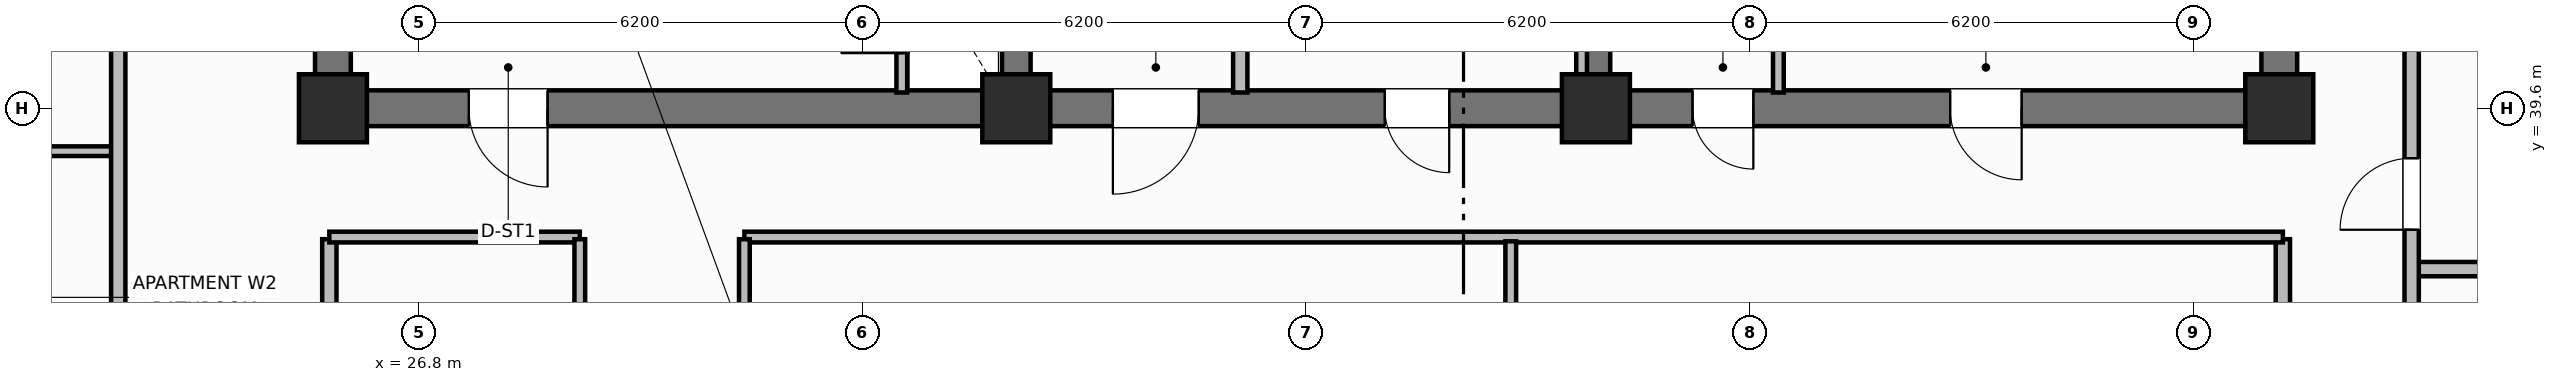
"""IFC4 building model, lengths in metres.
Left out: names, types, materials, properties, quantities, classifications, styles, units other than length and angle.
Written with IfcOpenShell. Run it as: python <this file> out.ifc"""

import sys

from ifc_helpers import new_model, si_unit, direction, frame, frame_2d, origin, origin_2d, place, context, subcontext, project, spatial, rectangle, extrude, element, fill, save


model = new_model("IFC4")
c1 = context("Model", 3, precision=1e-05, world=origin(), true_north=direction((0.0, 1.0)))
c2 = subcontext(c1, "Body", "Model", "MODEL_VIEW")
j1 = project(units=[si_unit("LENGTHUNIT", "METRE"), si_unit("PLANEANGLEUNIT", "RADIAN")], contexts=[c1])
p1 = place(None, origin())
s1 = spatial("IfcSite", under=j1, at=p1, CompositionType="ELEMENT")
p2 = place(p1, origin())
s2 = spatial("IfcBuilding", under=s1, at=p2, CompositionType="ELEMENT")
p3 = place(p2, frame((0.0, 0.0, 181.1)))
s3 = spatial("IfcBuildingStorey", under=s2, at=p3, CompositionType="ELEMENT", Elevation=181.1)
for number, where, z_axis, x_axis in (
    (1, (25.6, 39.85, 0.0), (0.0, 0.0, 1.0), (0.0, 1.0, 0.0)),
    (2, (52.8, 39.85, 0.0), (0.0, 0.0, 1.0), (0.0, 1.0, 0.0)),
):
    element("IfcWall", number, at=place(p3, frame(where, z_axis=z_axis, x_axis=x_axis)), inside=s3, PredefinedType="SHEAR", context=c2, shape_type="SweptSolid", body=[
        extrude(rectangle(XDim=5.7, YDim=0.5, at=frame_2d((2.85, 0.0))), origin(), (0.0, 0.0, 1.0), 3.7),
    ])
p4 = place(p3, frame((52.8, 39.6, 0.0), z_axis=(0.0, 0.0, 1.0), x_axis=(-1.0, 0.0, 0.0)))
e3 = element("IfcWall", 3, at=p4, inside=s3, PredefinedType="SHEAR", context=c2, shape_type="SweptSolid", body=[
    extrude(rectangle(XDim=27.2, YDim=0.5, at=frame_2d((13.6, 0.0))), origin(), (0.0, 0.0, 1.0), 3.7),
])
p5 = place(p4, frame((24.2, 0.0, 0.0)))
e4 = element("IfcOpeningElement", 4, at=p5, cuts=e3, PredefinedType="OPENING", context=c2, shape_type="SweptSolid", body=[
    extrude(rectangle(XDim=1.1, YDim=2.15, at=frame_2d((0.55, 1.075))), frame((0.0, 0.26, 0.0), z_axis=(0.0, -1.0, 0.0), x_axis=(1.0, 0.0, 0.0)), (0.0, 0.0, 1.0), 0.52),
])
p6 = place(p4, frame((15.1, 0.0, 0.0)))
e5 = element("IfcOpeningElement", 5, at=p6, cuts=e3, PredefinedType="OPENING", context=c2, shape_type="SweptSolid", body=[
    extrude(rectangle(XDim=1.2, YDim=2.15, at=frame_2d((0.6, 1.075))), frame((0.0, 0.26, 0.0), z_axis=(0.0, -1.0, 0.0), x_axis=(1.0, 0.0, 0.0)), (0.0, 0.0, 1.0), 0.52),
])
p7 = place(p4, frame((11.6, 0.0, 0.0)))
e6 = element("IfcOpeningElement", 6, at=p7, cuts=e3, PredefinedType="OPENING", context=c2, shape_type="SweptSolid", body=[
    extrude(rectangle(XDim=0.9, YDim=2.1, at=frame_2d((0.45, 1.05))), frame((0.0, 0.26, 0.0), z_axis=(0.0, -1.0, 0.0), x_axis=(1.0, 0.0, 0.0)), (0.0, 0.0, 1.0), 0.52),
])
p8 = place(p4, frame((7.35, 0.0, 0.0)))
e7 = element("IfcOpeningElement", 7, at=p8, cuts=e3, PredefinedType="OPENING", context=c2, shape_type="SweptSolid", body=[
    extrude(rectangle(XDim=0.85, YDim=2.1, at=frame_2d((0.425, 1.05))), frame((0.0, 0.26, 0.0), z_axis=(0.0, -1.0, 0.0), x_axis=(1.0, 0.0, 0.0)), (0.0, 0.0, 1.0), 0.52),
])
p9 = place(p4, frame((3.6, 0.0, 0.0)))
e8 = element("IfcOpeningElement", 8, at=p9, cuts=e3, PredefinedType="OPENING", context=c2, shape_type="SweptSolid", body=[
    extrude(rectangle(XDim=1.0, YDim=2.15, at=frame_2d((0.5, 1.075))), frame((0.0, 0.26, 0.0), z_axis=(0.0, -1.0, 0.0), x_axis=(1.0, 0.0, 0.0)), (0.0, 0.0, 1.0), 0.52),
])
for number, where, z_axis, x_axis in (
    (9, (35.15, 39.85, 0.0), (0.0, 0.0, 1.0), (0.0, 1.0, 0.0)),
    (10, (43.25, 39.85, 0.0), (0.0, 0.0, 1.0), (0.0, 1.0, 0.0)),
):
    element("IfcWall", number, at=place(p3, frame(where, z_axis=z_axis, x_axis=x_axis)), inside=s3, PredefinedType="SHEAR", context=c2, shape_type="SweptSolid", body=[
        extrude(rectangle(XDim=5.7, YDim=0.4, at=frame_2d((2.85, 0.0))), origin(), (0.0, 0.0, 1.0), 3.7),
    ])
for number, where, z_axis, x_axis in (
    (11, (25.6, 39.6, 0.0), (0.0, 0.0, 1.0), (1.0, 0.0, 0.0)),
    (12, (35.15, 39.6, 0.0), (0.0, 0.0, 1.0), (1.0, 0.0, 0.0)),
    (13, (43.25, 39.6, 0.0), (0.0, 0.0, 1.0), (1.0, 0.0, 0.0)),
    (14, (52.8, 39.6, 0.0), (0.0, 0.0, 1.0), (1.0, 0.0, 0.0)),
):
    element("IfcColumn", number, at=place(p3, frame(where, z_axis=z_axis, x_axis=x_axis)), inside=s3, PredefinedType="COLUMN", context=c2, shape_type="SweptSolid", body=[
        extrude(rectangle(XDim=0.95, YDim=0.95, at=origin_2d()), origin(), (0.0, 0.0, 1.0), 3.7),
    ])
p10 = place(p3, frame((33.55, 39.82, 0.0), z_axis=(0.0, 0.0, 1.0), x_axis=(0.0, 1.0, 0.0)))
e15 = element("IfcWall", 15, at=p10, inside=s3, PredefinedType="PARTITIONING", context=c2, shape_type="SweptSolid", body=[
    extrude(rectangle(XDim=2.13, YDim=0.15, at=frame_2d((1.065, 0.0))), origin(), (0.0, 0.0, 1.0), 2.55),
])
p11 = place(p10, frame((0.55, 0.0, 0.0)))
e16 = element("IfcOpeningElement", 16, at=p11, cuts=e15, PredefinedType="OPENING", context=c2, shape_type="SweptSolid", body=[
    extrude(rectangle(XDim=0.85, YDim=2.05, at=frame_2d((0.425, 1.025))), frame((0.0, 0.085, 0.0), z_axis=(0.0, -1.0, 0.0), x_axis=(1.0, 0.0, 0.0)), (0.0, 0.0, 1.0), 0.17),
])
p12 = place(p3, frame((38.28, 39.82, 0.0), z_axis=(0.0, 0.0, 1.0), x_axis=(0.0, 1.0, 0.0)))
e17 = element("IfcWall", 17, at=p12, inside=s3, PredefinedType="PARTITIONING", context=c2, shape_type="SweptSolid", body=[
    extrude(rectangle(XDim=5.63, YDim=0.2, at=frame_2d((2.815, 0.0))), origin(), (0.0, 0.0, 1.0), 2.55),
])
for number, where, z_axis, x_axis in (
    (18, (43.05, 39.82, 0.0), (0.0, 0.0, 1.0), (0.0, 1.0, 0.0)),
    (19, (45.8, 39.82, 0.0), (0.0, 0.0, 1.0), (0.0, 1.0, 0.0)),
):
    element("IfcWall", number, at=place(p3, frame(where, z_axis=z_axis, x_axis=x_axis)), inside=s3, PredefinedType="PARTITIONING", context=c2, shape_type="SweptSolid", body=[
        extrude(rectangle(XDim=5.63, YDim=0.15, at=frame_2d((2.815, 0.0))), origin(), (0.0, 0.0, 1.0), 2.55),
    ])
for number, where, z_axis, x_axis in (
    (20, (25.55, 18.63, 0.0), (0.0, 0.0, 1.0), (0.0, 1.0, 0.0)),
    (21, (52.85, 18.63, 0.0), (0.0, 0.0, 1.0), (0.0, 1.0, 0.0)),
):
    element("IfcWall", number, at=place(p3, frame(where, z_axis=z_axis, x_axis=x_axis)), inside=s3, PredefinedType="PARTITIONING", context=c2, shape_type="SweptSolid", body=[
        extrude(rectangle(XDim=19.14, YDim=0.2, at=frame_2d((9.57, 0.0))), origin(), (0.0, 0.0, 1.0), 2.55),
    ])
p13 = place(p3, frame((25.55, 37.8, 0.0), z_axis=(0.0, 0.0, 1.0), x_axis=(1.0, 0.0, 0.0)))
e22 = element("IfcWall", 22, at=p13, inside=s3, PredefinedType="PARTITIONING", context=c2, shape_type="SweptSolid", body=[
    extrude(rectangle(XDim=3.5, YDim=0.15, at=frame_2d((1.75, 0.0))), origin(), (0.0, 0.0, 1.0), 2.55),
])
p14 = place(p3, frame((31.35, 37.8, 0.0), z_axis=(0.0, 0.0, 1.0), x_axis=(1.0, 0.0, 0.0)))
e23 = element("IfcWall", 23, at=p14, inside=s3, PredefinedType="PARTITIONING", context=c2, shape_type="SweptSolid", body=[
    extrude(rectangle(XDim=21.5, YDim=0.15, at=frame_2d((10.75, 0.0))), origin(), (0.0, 0.0, 1.0), 2.55),
])
p15 = place(p3, frame((42.06, 18.66, 0.0), z_axis=(0.0, 0.0, 1.0), x_axis=(0.0, 1.0, 0.0)))
e24 = element("IfcWall", 24, at=p15, inside=s3, PredefinedType="PARTITIONING", context=c2, shape_type="SweptSolid", body=[
    extrude(rectangle(XDim=19.08, YDim=0.15, at=frame_2d((9.54, 0.0))), origin(), (0.0, 0.0, 1.0), 2.55),
])
p16 = place(p15, frame((6.5, 0.0, 0.0)))
e25 = element("IfcOpeningElement", 25, at=p16, cuts=e24, PredefinedType="OPENING", context=c2, shape_type="SweptSolid", body=[
    extrude(rectangle(XDim=1.0, YDim=2.15, at=frame_2d((0.5, 1.075))), frame((0.0, 0.085, 0.0), z_axis=(0.0, -1.0, 0.0), x_axis=(1.0, 0.0, 0.0)), (0.0, 0.0, 1.0), 0.17),
])
p17 = place(p3, frame((29.05, 18.63, 0.0), z_axis=(0.0, 0.0, 1.0), x_axis=(0.0, 1.0, 0.0)))
e26 = element("IfcWall", 26, at=p17, inside=s3, PredefinedType="PARTITIONING", context=c2, shape_type="SweptSolid", body=[
    extrude(rectangle(XDim=19.14, YDim=0.15, at=frame_2d((9.57, 0.0))), origin(), (0.0, 0.0, 1.0), 2.55),
])
p18 = place(p17, frame((5.5, 0.0, 0.0)))
e27 = element("IfcOpeningElement", 27, at=p18, cuts=e26, PredefinedType="OPENING", context=c2, shape_type="SweptSolid", body=[
    extrude(rectangle(XDim=1.0, YDim=2.15, at=frame_2d((0.5, 1.075))), frame((0.0, 0.085, 0.0), z_axis=(0.0, -1.0, 0.0), x_axis=(1.0, 0.0, 0.0)), (0.0, 0.0, 1.0), 0.17),
])
p19 = place(p3, frame((31.35, 18.63, 0.0), z_axis=(0.0, 0.0, 1.0), x_axis=(0.0, 1.0, 0.0)))
e28 = element("IfcWall", 28, at=p19, inside=s3, PredefinedType="PARTITIONING", context=c2, shape_type="SweptSolid", body=[
    extrude(rectangle(XDim=19.14, YDim=0.15, at=frame_2d((9.57, 0.0))), origin(), (0.0, 0.0, 1.0), 2.55),
])
p20 = place(p19, frame((5.5, 0.0, 0.0)))
e29 = element("IfcOpeningElement", 29, at=p20, cuts=e28, PredefinedType="OPENING", context=c2, shape_type="SweptSolid", body=[
    extrude(rectangle(XDim=1.0, YDim=2.15, at=frame_2d((0.5, 1.075))), frame((0.0, 0.085, 0.0), z_axis=(0.0, -1.0, 0.0), x_axis=(1.0, 0.0, 0.0)), (0.0, 0.0, 1.0), 0.17),
])
p21 = place(p3, frame((20.35, 39.0, 0.0), z_axis=(0.0, 0.0, 1.0), x_axis=(1.0, 0.0, 0.0)))
e30 = element("IfcWall", 30, at=p21, inside=s3, PredefinedType="PARTITIONING", context=c2, shape_type="SweptSolid", body=[
    extrude(rectangle(XDim=2.25, YDim=0.135, at=frame_2d((1.125, 0.0))), origin(), (0.0, 0.0, 1.0), 2.55),
])
p22 = place(p3, frame((22.6, 10.6, 0.0), z_axis=(0.0, 0.0, 1.0), x_axis=(0.0, 1.0, 0.0)))
e31 = element("IfcWall", 31, at=p22, inside=s3, PredefinedType="PARTITIONING", context=c2, shape_type="SweptSolid", body=[
    extrude(rectangle(XDim=35.2, YDim=0.2, at=frame_2d((17.6, 0.0))), origin(), (0.0, 0.0, 1.0), 2.55),
])
p23 = place(p22, frame((2.65, 0.0, 0.0)))
e32 = element("IfcOpeningElement", 32, at=p23, cuts=e31, PredefinedType="OPENING", context=c2, shape_type="SweptSolid", body=[
    extrude(rectangle(XDim=1.0, YDim=2.15, at=frame_2d((0.5, 1.075))), frame((0.0, 0.11, 0.0), z_axis=(0.0, -1.0, 0.0), x_axis=(1.0, 0.0, 0.0)), (0.0, 0.0, 1.0), 0.22),
])
p24 = place(p22, frame((22.75, 0.0, 0.0)))
e33 = element("IfcOpeningElement", 33, at=p24, cuts=e31, PredefinedType="OPENING", context=c2, shape_type="SweptSolid", body=[
    extrude(rectangle(XDim=1.0, YDim=2.15, at=frame_2d((0.5, 1.075))), frame((0.0, 0.11, 0.0), z_axis=(0.0, -1.0, 0.0), x_axis=(1.0, 0.0, 0.0)), (0.0, 0.0, 1.0), 0.22),
])
p25 = place(p3, frame((54.65, 37.352, 0.0), z_axis=(0.0, 0.0, 1.0), x_axis=(1.0, 0.0, 0.0)))
e34 = element("IfcWall", 34, at=p25, inside=s3, PredefinedType="PARTITIONING", context=c2, shape_type="SweptSolid", body=[
    extrude(rectangle(XDim=7.18, YDim=0.2, at=frame_2d((3.59, 0.0))), origin(), (0.0, 0.0, 1.0), 2.55),
])
p26 = place(p3, frame((54.65, 10.6, 0.0), z_axis=(0.0, 0.0, 1.0), x_axis=(0.0, 1.0, 0.0)))
e35 = element("IfcWall", 35, at=p26, inside=s3, PredefinedType="PARTITIONING", context=c2, shape_type="SweptSolid", body=[
    extrude(rectangle(XDim=35.2, YDim=0.2, at=frame_2d((17.6, 0.0))), origin(), (0.0, 0.0, 1.0), 2.55),
])
p27 = place(p26, frame((2.65, 0.0, 0.0)))
e36 = element("IfcOpeningElement", 36, at=p27, cuts=e35, PredefinedType="OPENING", context=c2, shape_type="SweptSolid", body=[
    extrude(rectangle(XDim=1.0, YDim=2.15, at=frame_2d((0.5, 1.075))), frame((0.0, 0.11, 0.0), z_axis=(0.0, -1.0, 0.0), x_axis=(1.0, 0.0, 0.0)), (0.0, 0.0, 1.0), 0.22),
])
p28 = place(p26, frame((11.352, 0.0, 0.0)))
e37 = element("IfcOpeningElement", 37, at=p28, cuts=e35, PredefinedType="OPENING", context=c2, shape_type="SweptSolid", body=[
    extrude(rectangle(XDim=1.0, YDim=2.15, at=frame_2d((0.5, 1.075))), frame((0.0, 0.11, 0.0), z_axis=(0.0, -1.0, 0.0), x_axis=(1.0, 0.0, 0.0)), (0.0, 0.0, 1.0), 0.22),
])
p29 = place(p26, frame((21.37, 0.0, 0.0)))
e38 = element("IfcOpeningElement", 38, at=p29, cuts=e35, PredefinedType="OPENING", context=c2, shape_type="SweptSolid", body=[
    extrude(rectangle(XDim=1.0, YDim=2.15, at=frame_2d((0.5, 1.075))), frame((0.0, 0.11, 0.0), z_axis=(0.0, -1.0, 0.0), x_axis=(1.0, 0.0, 0.0)), (0.0, 0.0, 1.0), 0.22),
])
p30 = place(p26, frame((27.302, 0.0, 0.0)))
e39 = element("IfcOpeningElement", 39, at=p30, cuts=e35, PredefinedType="OPENING", context=c2, shape_type="SweptSolid", body=[
    extrude(rectangle(XDim=1.0, YDim=2.15, at=frame_2d((0.5, 1.075))), frame((0.0, 0.11, 0.0), z_axis=(0.0, -1.0, 0.0), x_axis=(1.0, 0.0, 0.0)), (0.0, 0.0, 1.0), 0.22),
])
p31 = place(p11, origin())
e40 = element("IfcDoor", 40, at=p31, inside=s3, OperationType="SINGLE_SWING_LEFT", PredefinedType="TRAPDOOR", context=c2, shape_type="SweptSolid", body=[
    extrude(rectangle(XDim=0.85, YDim=2.05, at=frame_2d((0.425, 1.025))), frame((0.0, 0.025, 0.0), z_axis=(0.0, -1.0, 0.0), x_axis=(1.0, 0.0, 0.0)), (0.0, 0.0, 1.0), 0.05),
])
fill(e16, e40)
p32 = place(p30, origin())
e41 = element("IfcDoor", 41, at=p32, inside=s3, OperationType="SINGLE_SWING_LEFT", PredefinedType="DOOR", context=c2, shape_type="SweptSolid", body=[
    extrude(rectangle(XDim=1.0, YDim=2.15, at=frame_2d((0.5, 1.075))), frame((0.0, 0.025, 0.0), z_axis=(0.0, -1.0, 0.0), x_axis=(1.0, 0.0, 0.0)), (0.0, 0.0, 1.0), 0.05),
])
fill(e39, e41)
p33 = place(p5, origin())
e42 = element("IfcDoor", 42, at=p33, inside=s3, OperationType="SINGLE_SWING_LEFT", PredefinedType="DOOR", context=c2, shape_type="SweptSolid", body=[
    extrude(rectangle(XDim=1.1, YDim=2.15, at=frame_2d((0.55, 1.075))), frame((0.0, 0.025, 0.0), z_axis=(0.0, -1.0, 0.0), x_axis=(1.0, 0.0, 0.0)), (0.0, 0.0, 1.0), 0.05),
])
fill(e4, e42)
p34 = place(p6, origin())
e43 = element("IfcDoor", 43, at=p34, inside=s3, OperationType="SINGLE_SWING_RIGHT", PredefinedType="DOOR", context=c2, shape_type="SweptSolid", body=[
    extrude(rectangle(XDim=1.2, YDim=2.15, at=frame_2d((0.6, 1.075))), frame((0.0, 0.025, 0.0), z_axis=(0.0, -1.0, 0.0), x_axis=(1.0, 0.0, 0.0)), (0.0, 0.0, 1.0), 0.05),
])
fill(e5, e43)
p35 = place(p7, origin())
e44 = element("IfcDoor", 44, at=p35, inside=s3, OperationType="SINGLE_SWING_LEFT", PredefinedType="DOOR", context=c2, shape_type="SweptSolid", body=[
    extrude(rectangle(XDim=0.9, YDim=2.1, at=frame_2d((0.45, 1.05))), frame((0.0, 0.025, 0.0), z_axis=(0.0, -1.0, 0.0), x_axis=(1.0, 0.0, 0.0)), (0.0, 0.0, 1.0), 0.05),
])
fill(e6, e44)
p36 = place(p8, origin())
e45 = element("IfcDoor", 45, at=p36, inside=s3, OperationType="SINGLE_SWING_LEFT", PredefinedType="DOOR", context=c2, shape_type="SweptSolid", body=[
    extrude(rectangle(XDim=0.85, YDim=2.1, at=frame_2d((0.425, 1.05))), frame((0.0, 0.025, 0.0), z_axis=(0.0, -1.0, 0.0), x_axis=(1.0, 0.0, 0.0)), (0.0, 0.0, 1.0), 0.05),
])
fill(e7, e45)
p37 = place(p9, origin())
e46 = element("IfcDoor", 46, at=p37, inside=s3, OperationType="SINGLE_SWING_LEFT", PredefinedType="DOOR", context=c2, shape_type="SweptSolid", body=[
    extrude(rectangle(XDim=1.0, YDim=2.15, at=frame_2d((0.5, 1.075))), frame((0.0, 0.025, 0.0), z_axis=(0.0, -1.0, 0.0), x_axis=(1.0, 0.0, 0.0)), (0.0, 0.0, 1.0), 0.05),
])
fill(e8, e46)
save(model, sys.argv[1])
